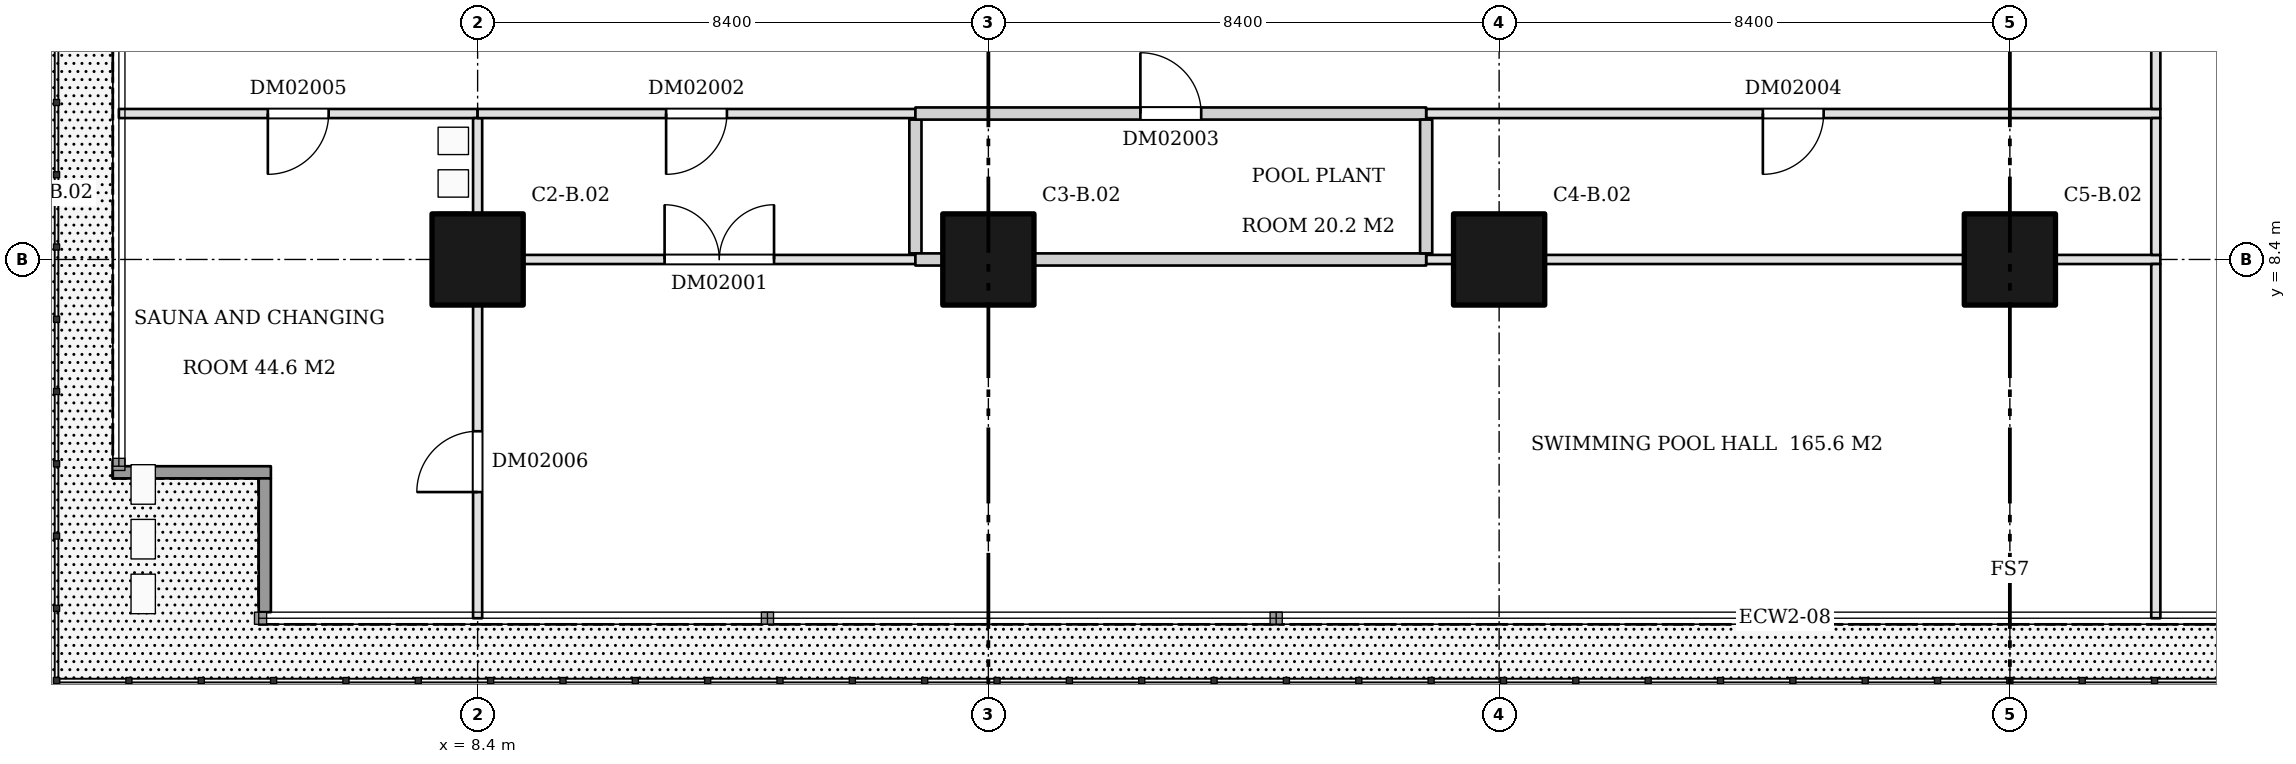
"""IFC4 building model, lengths in metres.
Left out: names, types, materials, properties, quantities, classifications, styles, units other than length and angle.
Written with IfcOpenShell. Run it as: python <this file> out.ifc"""

import sys

from ifc_helpers import new_model, si_unit, direction, frame, frame_2d, origin, origin_2d, place, context, subcontext, project, spatial, rectangle, extrude, element, fill, save


model = new_model("IFC4")
c1 = context("Model", 3, precision=1e-05, world=origin(), true_north=direction((0.0, 1.0)))
c2 = subcontext(c1, "Body", "Model", "MODEL_VIEW")
j1 = project(units=[si_unit("LENGTHUNIT", "METRE"), si_unit("PLANEANGLEUNIT", "RADIAN")], contexts=[c1])
p1 = place(None, origin())
s1 = spatial("IfcSite", under=j1, at=p1, CompositionType="ELEMENT")
p2 = place(p1, origin())
s2 = spatial("IfcBuilding", under=s1, at=p2, CompositionType="ELEMENT")
p3 = place(p2, frame((0.0, 0.0, 14.4)))
s3 = spatial("IfcBuildingStorey", under=s2, at=p3, CompositionType="ELEMENT", Elevation=14.4)
for number, where, z_axis, x_axis in (
    (1, (8.4, 8.4, 0.0), (0.0, 0.0, 1.0), (1.0, 0.0, 0.0)),
    (2, (16.8, 8.4, 0.0), (0.0, 0.0, 1.0), (1.0, 0.0, 0.0)),
    (3, (25.2, 8.4, 0.0), (0.0, 0.0, 1.0), (1.0, 0.0, 0.0)),
    (4, (33.6, 8.4, 0.0), (0.0, 0.0, 1.0), (1.0, 0.0, 0.0)),
):
    element("IfcColumn", number, at=place(p3, frame(where, z_axis=z_axis, x_axis=x_axis)), inside=s3, PredefinedType="COLUMN", context=c2, shape_type="SweptSolid", body=[
        extrude(rectangle(XDim=1.5, YDim=1.5, at=origin_2d()), origin(), (0.0, 0.0, 1.0), 5.1),
    ])
p4 = place(p3, frame((2.5, 10.8, 0.0), z_axis=(0.0, 0.0, 1.0), x_axis=(1.0, 0.0, 0.0)))
e5 = element("IfcWall", 5, at=p4, inside=s3, PredefinedType="PARTITIONING", context=c2, shape_type="SweptSolid", body=[
    extrude(rectangle(XDim=5.9, YDim=0.15, at=frame_2d((2.95, 0.0))), origin(), (0.0, 0.0, 1.0), 5.1),
])
p5 = place(p4, frame((2.45, 0.0, 0.0)))
e6 = element("IfcOpeningElement", 6, at=p5, cuts=e5, PredefinedType="OPENING", context=c2, shape_type="SweptSolid", body=[
    extrude(rectangle(XDim=1.0, YDim=2.1, at=frame_2d((0.5, 1.05))), frame((0.0, 0.085, 0.0), z_axis=(0.0, -1.0, 0.0), x_axis=(1.0, 0.0, 0.0)), (0.0, 0.0, 1.0), 0.17),
])
p6 = place(p3, frame((8.4, 2.5, 0.0), z_axis=(0.0, 0.0, 1.0), x_axis=(0.0, 1.0, 0.0)))
e7 = element("IfcWall", 7, at=p6, inside=s3, PredefinedType="PARTITIONING", context=c2, shape_type="SweptSolid", body=[
    extrude(rectangle(XDim=5.15, YDim=0.15, at=frame_2d((2.575, 0.0))), origin(), (0.0, 0.0, 1.0), 5.1),
])
p7 = place(p6, frame((2.075, 0.0, 0.0)))
e8 = element("IfcOpeningElement", 8, at=p7, cuts=e7, PredefinedType="OPENING", context=c2, shape_type="SweptSolid", body=[
    extrude(rectangle(XDim=1.0, YDim=2.1, at=frame_2d((0.5, 1.05))), frame((0.0, 0.085, 0.0), z_axis=(0.0, -1.0, 0.0), x_axis=(1.0, 0.0, 0.0)), (0.0, 0.0, 1.0), 0.17),
])
p8 = place(p3, frame((8.4, 9.15, 0.0), z_axis=(0.0, 0.0, 1.0), x_axis=(0.0, 1.0, 0.0)))
e9 = element("IfcWall", 9, at=p8, inside=s3, PredefinedType="PARTITIONING", context=c2, shape_type="SweptSolid", body=[
    extrude(rectangle(XDim=1.575, YDim=0.15, at=frame_2d((0.788, 0.0))), origin(), (0.0, 0.0, 1.0), 5.1),
])
p9 = place(p3, frame((9.15, 8.4, 0.0), z_axis=(0.0, 0.0, 1.0), x_axis=(1.0, 0.0, 0.0)))
e10 = element("IfcWall", 10, at=p9, inside=s3, PredefinedType="PARTITIONING", context=c2, shape_type="SweptSolid", body=[
    extrude(rectangle(XDim=6.45, YDim=0.15, at=frame_2d((3.225, 0.0))), origin(), (0.0, 0.0, 1.0), 5.1),
])
p10 = place(p9, frame((2.325, 0.0, 0.0)))
e11 = element("IfcOpeningElement", 11, at=p10, cuts=e10, PredefinedType="OPENING", context=c2, shape_type="SweptSolid", body=[
    extrude(rectangle(XDim=1.8, YDim=2.1, at=frame_2d((0.9, 1.05))), frame((0.0, 0.085, 0.0), z_axis=(0.0, -1.0, 0.0), x_axis=(1.0, 0.0, 0.0)), (0.0, 0.0, 1.0), 0.17),
])
p11 = place(p3, frame((8.4, 10.8, 0.0), z_axis=(0.0, 0.0, 1.0), x_axis=(1.0, 0.0, 0.0)))
e12 = element("IfcWall", 12, at=p11, inside=s3, PredefinedType="PARTITIONING", context=c2, shape_type="SweptSolid", body=[
    extrude(rectangle(XDim=7.2, YDim=0.15, at=frame_2d((3.6, 0.0))), origin(), (0.0, 0.0, 1.0), 5.1),
])
p12 = place(p11, frame((3.1, 0.0, 0.0)))
e13 = element("IfcOpeningElement", 13, at=p12, cuts=e12, PredefinedType="OPENING", context=c2, shape_type="SweptSolid", body=[
    extrude(rectangle(XDim=1.0, YDim=2.1, at=frame_2d((0.5, 1.05))), frame((0.0, 0.085, 0.0), z_axis=(0.0, -1.0, 0.0), x_axis=(1.0, 0.0, 0.0)), (0.0, 0.0, 1.0), 0.17),
])
p13 = place(p3, frame((15.6, 8.5, 0.0), z_axis=(0.0, 0.0, 1.0), x_axis=(0.0, 1.0, 0.0)))
e14 = element("IfcWall", 14, at=p13, inside=s3, PredefinedType="PARTITIONING", context=c2, shape_type="SweptSolid", body=[
    extrude(rectangle(XDim=2.2, YDim=0.2, at=frame_2d((1.1, 0.0))), origin(), (0.0, 0.0, 1.0), 5.1),
])
p14 = place(p3, frame((15.6, 8.4, 0.0), z_axis=(0.0, 0.0, 1.0), x_axis=(1.0, 0.0, 0.0)))
e15 = element("IfcWall", 15, at=p14, inside=s3, PredefinedType="PARTITIONING", context=c2, shape_type="SweptSolid", body=[
    extrude(rectangle(XDim=0.45, YDim=0.2, at=frame_2d((0.225, 0.0))), origin(), (0.0, 0.0, 1.0), 5.1),
])
p15 = place(p3, frame((17.55, 8.4, 0.0), z_axis=(0.0, 0.0, 1.0), x_axis=(1.0, 0.0, 0.0)))
e16 = element("IfcWall", 16, at=p15, inside=s3, PredefinedType="PARTITIONING", context=c2, shape_type="SweptSolid", body=[
    extrude(rectangle(XDim=6.45, YDim=0.2, at=frame_2d((3.225, 0.0))), origin(), (0.0, 0.0, 1.0), 5.1),
])
p16 = place(p3, frame((15.6, 10.8, 0.0), z_axis=(0.0, 0.0, 1.0), x_axis=(1.0, 0.0, 0.0)))
e17 = element("IfcWall", 17, at=p16, inside=s3, PredefinedType="PARTITIONING", context=c2, shape_type="SweptSolid", body=[
    extrude(rectangle(XDim=8.4, YDim=0.2, at=frame_2d((4.2, 0.0))), origin(), (0.0, 0.0, 1.0), 5.1),
])
p17 = place(p16, frame((3.7, 0.0, 0.0)))
e18 = element("IfcOpeningElement", 18, at=p17, cuts=e17, PredefinedType="OPENING", context=c2, shape_type="SweptSolid", body=[
    extrude(rectangle(XDim=1.0, YDim=2.1, at=frame_2d((0.5, 1.05))), frame((0.0, 0.11, 0.0), z_axis=(0.0, -1.0, 0.0), x_axis=(1.0, 0.0, 0.0)), (0.0, 0.0, 1.0), 0.22),
])
p18 = place(p3, frame((24.0, 8.5, 0.0), z_axis=(0.0, 0.0, 1.0), x_axis=(0.0, 1.0, 0.0)))
e19 = element("IfcWall", 19, at=p18, inside=s3, PredefinedType="PARTITIONING", context=c2, shape_type="SweptSolid", body=[
    extrude(rectangle(XDim=2.2, YDim=0.2, at=frame_2d((1.1, 0.0))), origin(), (0.0, 0.0, 1.0), 5.1),
])
p19 = place(p3, frame((24.0, 8.4, 0.0), z_axis=(0.0, 0.0, 1.0), x_axis=(1.0, 0.0, 0.0)))
e20 = element("IfcWall", 20, at=p19, inside=s3, PredefinedType="PARTITIONING", context=c2, shape_type="SweptSolid", body=[
    extrude(rectangle(XDim=0.45, YDim=0.15, at=frame_2d((0.225, 0.0))), origin(), (0.0, 0.0, 1.0), 5.1),
])
p20 = place(p3, frame((25.95, 8.4, 0.0), z_axis=(0.0, 0.0, 1.0), x_axis=(1.0, 0.0, 0.0)))
e21 = element("IfcWall", 21, at=p20, inside=s3, PredefinedType="PARTITIONING", context=c2, shape_type="SweptSolid", body=[
    extrude(rectangle(XDim=6.9, YDim=0.15, at=frame_2d((3.45, 0.0))), origin(), (0.0, 0.0, 1.0), 5.1),
])
p21 = place(p3, frame((34.35, 8.4, 0.0), z_axis=(0.0, 0.0, 1.0), x_axis=(1.0, 0.0, 0.0)))
e22 = element("IfcWall", 22, at=p21, inside=s3, PredefinedType="PARTITIONING", context=c2, shape_type="SweptSolid", body=[
    extrude(rectangle(XDim=1.725, YDim=0.15, at=frame_2d((0.862, 0.0))), origin(), (0.0, 0.0, 1.0), 5.1),
])
p22 = place(p3, frame((24.0, 10.8, 0.0), z_axis=(0.0, 0.0, 1.0), x_axis=(1.0, 0.0, 0.0)))
e23 = element("IfcWall", 23, at=p22, inside=s3, PredefinedType="PARTITIONING", context=c2, shape_type="SweptSolid", body=[
    extrude(rectangle(XDim=12.075, YDim=0.15, at=frame_2d((6.038, 0.0))), origin(), (0.0, 0.0, 1.0), 5.1),
])
p23 = place(p22, frame((5.538, 0.0, 0.0)))
e24 = element("IfcOpeningElement", 24, at=p23, cuts=e23, PredefinedType="OPENING", context=c2, shape_type="SweptSolid", body=[
    extrude(rectangle(XDim=1.0, YDim=2.1, at=frame_2d((0.5, 1.05))), frame((0.0, 0.085, 0.0), z_axis=(0.0, -1.0, 0.0), x_axis=(1.0, 0.0, 0.0)), (0.0, 0.0, 1.0), 0.17),
])
p24 = place(p3, frame((36.0, 2.5, 0.0), z_axis=(0.0, 0.0, 1.0), x_axis=(0.0, 1.0, 0.0)))
e25 = element("IfcWall", 25, at=p24, inside=s3, PredefinedType="PARTITIONING", context=c2, shape_type="SweptSolid", body=[
    extrude(rectangle(XDim=5.825, YDim=0.15, at=frame_2d((2.913, 0.0))), origin(), (0.0, 0.0, 1.0), 5.1),
])
p25 = place(p3, frame((36.0, 8.475, 0.0), z_axis=(0.0, 0.0, 1.0), x_axis=(0.0, 1.0, 0.0)))
e26 = element("IfcWall", 26, at=p25, inside=s3, PredefinedType="PARTITIONING", context=c2, shape_type="SweptSolid", body=[
    extrude(rectangle(XDim=2.25, YDim=0.15, at=frame_2d((1.125, 0.0))), origin(), (0.0, 0.0, 1.0), 5.1),
])
p26 = place(p3, frame((36.0, 10.875, 0.0), z_axis=(0.0, 0.0, 1.0), x_axis=(0.0, 1.0, 0.0)))
e27 = element("IfcWall", 27, at=p26, inside=s3, PredefinedType="PARTITIONING", context=c2, shape_type="SweptSolid", body=[
    extrude(rectangle(XDim=3.45, YDim=0.15, at=frame_2d((1.725, 0.0))), origin(), (0.0, 0.0, 1.0), 5.1),
])
p27 = place(p3, frame((2.4, 4.9, 0.0), z_axis=(0.0, 0.0, 1.0), x_axis=(1.0, 0.0, 0.0)))
e28 = element("IfcWall", 28, at=p27, inside=s3, PredefinedType="SOLIDWALL", context=c2, shape_type="SweptSolid", body=[
    extrude(rectangle(XDim=2.6, YDim=0.2, at=frame_2d((1.3, 0.0))), origin(), (0.0, 0.0, 1.0), 5.1),
])
p28 = place(p3, frame((4.9, 4.8, 0.0), z_axis=(0.0, 0.0, 1.0), x_axis=(0.0, -1.0, 0.0)))
e29 = element("IfcWall", 29, at=p28, inside=s3, PredefinedType="SOLIDWALL", context=c2, shape_type="SweptSolid", body=[
    extrude(rectangle(XDim=2.2, YDim=0.2, at=frame_2d((1.1, 0.0))), origin(), (0.0, 0.0, 1.0), 5.1),
])
p29 = place(p10, origin())
e30 = element("IfcDoor", 30, at=p29, inside=s3, OperationType="DOUBLE_DOOR_SINGLE_SWING", PredefinedType="DOOR", context=c2, shape_type="SweptSolid", body=[
    extrude(rectangle(XDim=1.8, YDim=2.1, at=frame_2d((0.9, 1.05))), frame((0.0, 0.025, 0.0), z_axis=(0.0, -1.0, 0.0), x_axis=(1.0, 0.0, 0.0)), (0.0, 0.0, 1.0), 0.05),
])
fill(e11, e30)
p30 = place(p12, frame((1.0, 0.0, 0.0), z_axis=(0.0, 0.0, 1.0), x_axis=(-1.0, 0.0, 0.0)))
e31 = element("IfcDoor", 31, at=p30, inside=s3, OperationType="SINGLE_SWING_RIGHT", PredefinedType="DOOR", context=c2, shape_type="SweptSolid", body=[
    extrude(rectangle(XDim=1.0, YDim=2.1, at=frame_2d((0.5, 1.05))), frame((0.0, 0.025, 0.0), z_axis=(0.0, -1.0, 0.0), x_axis=(1.0, 0.0, 0.0)), (0.0, 0.0, 1.0), 0.05),
])
fill(e13, e31)
p31 = place(p17, origin())
e32 = element("IfcDoor", 32, at=p31, inside=s3, OperationType="SINGLE_SWING_LEFT", PredefinedType="DOOR", context=c2, shape_type="SweptSolid", body=[
    extrude(rectangle(XDim=1.0, YDim=2.1, at=frame_2d((0.5, 1.05))), frame((0.0, 0.025, 0.0), z_axis=(0.0, -1.0, 0.0), x_axis=(1.0, 0.0, 0.0)), (0.0, 0.0, 1.0), 0.05),
])
fill(e18, e32)
p32 = place(p23, frame((1.0, 0.0, 0.0), z_axis=(0.0, 0.0, 1.0), x_axis=(-1.0, 0.0, 0.0)))
e33 = element("IfcDoor", 33, at=p32, inside=s3, OperationType="SINGLE_SWING_RIGHT", PredefinedType="DOOR", context=c2, shape_type="SweptSolid", body=[
    extrude(rectangle(XDim=1.0, YDim=2.1, at=frame_2d((0.5, 1.05))), frame((0.0, 0.025, 0.0), z_axis=(0.0, -1.0, 0.0), x_axis=(1.0, 0.0, 0.0)), (0.0, 0.0, 1.0), 0.05),
])
fill(e24, e33)
p33 = place(p5, frame((1.0, 0.0, 0.0), z_axis=(0.0, 0.0, 1.0), x_axis=(-1.0, 0.0, 0.0)))
e34 = element("IfcDoor", 34, at=p33, inside=s3, OperationType="SINGLE_SWING_RIGHT", PredefinedType="DOOR", context=c2, shape_type="SweptSolid", body=[
    extrude(rectangle(XDim=1.0, YDim=2.1, at=frame_2d((0.5, 1.05))), frame((0.0, 0.025, 0.0), z_axis=(0.0, -1.0, 0.0), x_axis=(1.0, 0.0, 0.0)), (0.0, 0.0, 1.0), 0.05),
])
fill(e6, e34)
p34 = place(p7, origin())
e35 = element("IfcDoor", 35, at=p34, inside=s3, OperationType="SINGLE_SWING_LEFT", PredefinedType="DOOR", context=c2, shape_type="SweptSolid", body=[
    extrude(rectangle(XDim=1.0, YDim=2.1, at=frame_2d((0.5, 1.05))), frame((0.0, 0.025, 0.0), z_axis=(0.0, -1.0, 0.0), x_axis=(1.0, 0.0, 0.0)), (0.0, 0.0, 1.0), 0.05),
])
fill(e8, e35)
save(model, sys.argv[1])
